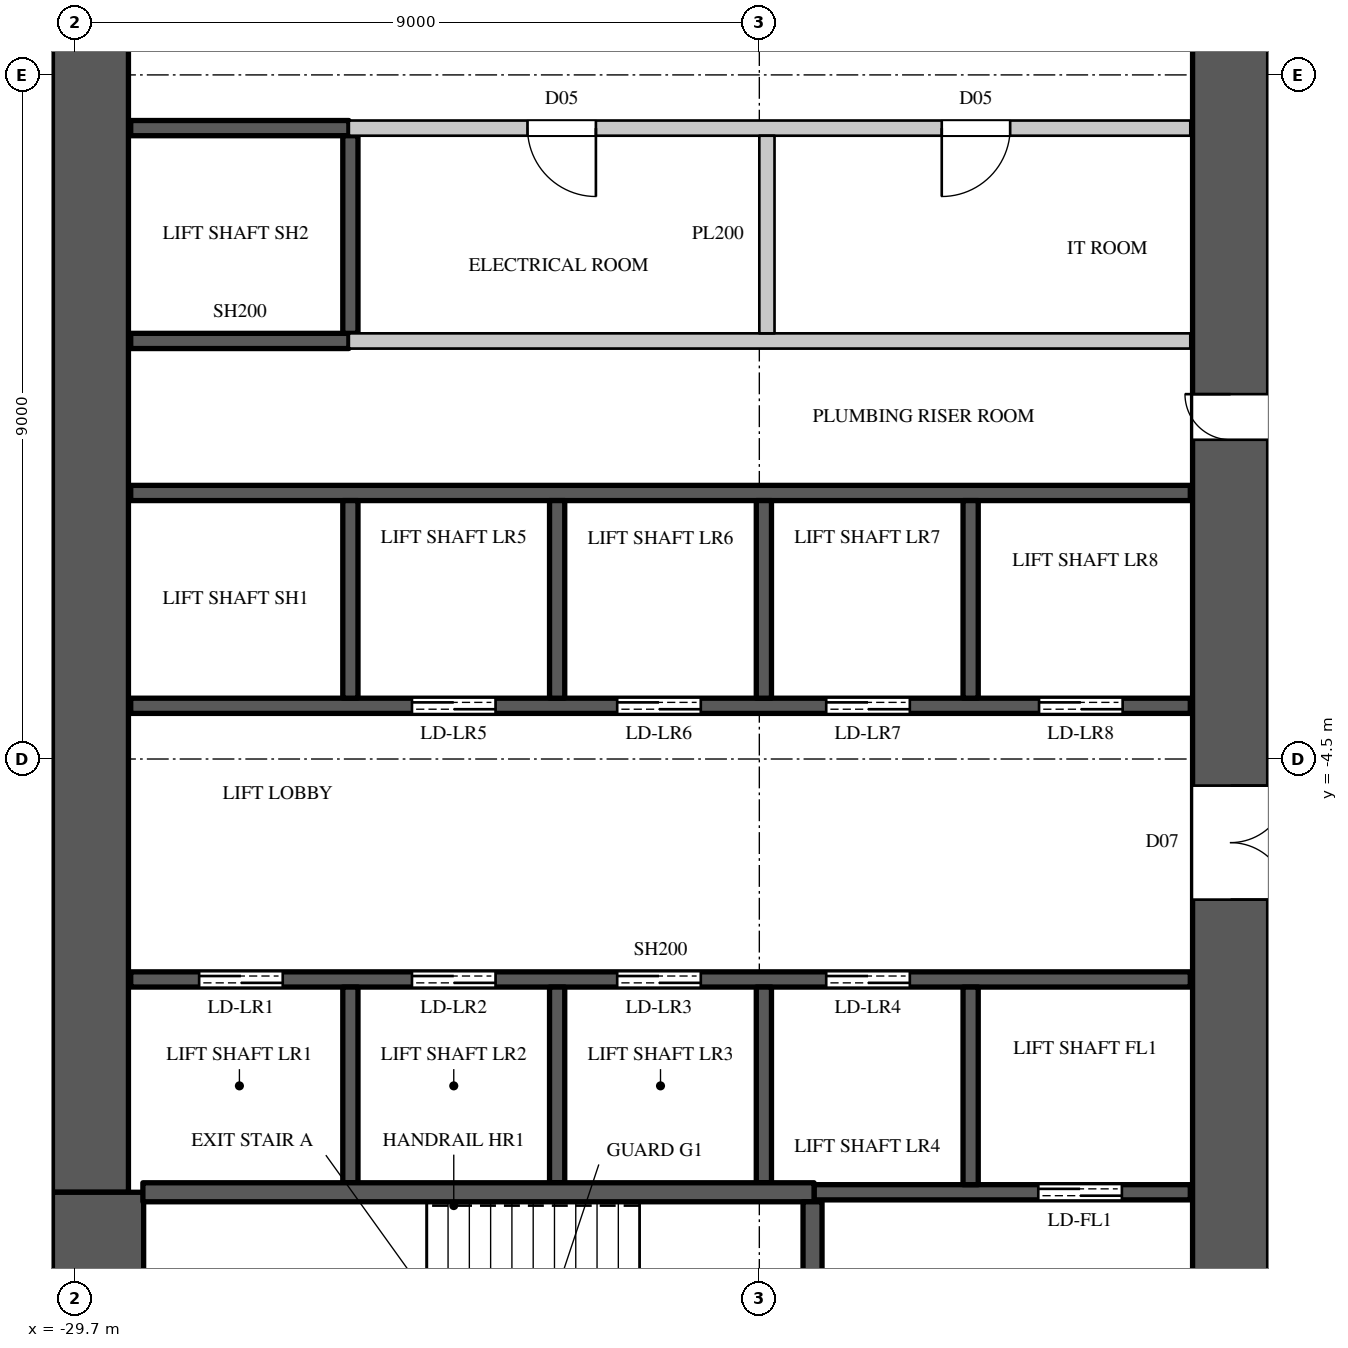
"""IFC4 building model, lengths in metres.
Left out: names, types, materials, properties, quantities, classifications, styles, units other than length and angle.
Written with IfcOpenShell. Run it as: python <this file> out.ifc"""

import sys

from ifc_helpers import new_model, si_unit, direction, frame, frame_2d, origin, place, context, subcontext, project, spatial, rectangle, extrude, element, fill, save


model = new_model("IFC4")
c1 = context("Model", 3, precision=1e-05, world=origin(), true_north=direction((0.0, 1.0)))
c2 = subcontext(c1, "Body", "Model", "MODEL_VIEW")
j1 = project(units=[si_unit("LENGTHUNIT", "METRE"), si_unit("PLANEANGLEUNIT", "RADIAN")], contexts=[c1])
p1 = place(None, origin())
s1 = spatial("IfcSite", under=j1, at=p1, CompositionType="ELEMENT")
p2 = place(p1, origin())
s2 = spatial("IfcBuilding", under=s1, at=p2, CompositionType="ELEMENT")
p3 = place(p2, frame((0.0, 0.0, 138.3)))
s3 = spatial("IfcBuildingStorey", under=s2, at=p3, CompositionType="ELEMENT", Elevation=138.3)
p4 = place(p3, frame((-14.5, -14.8, 0.0), z_axis=(0.0, 0.0, 1.0), x_axis=(0.0, 1.0, 0.0)))
e1 = element("IfcWall", 1, at=p4, inside=s3, PredefinedType="SHEAR", context=c2, shape_type="SweptSolid", body=[
    extrude(rectangle(XDim=29.6, YDim=1.0, at=frame_2d((14.8, 0.0))), origin(), (0.0, 0.0, 1.0), 3.6),
])
p5 = place(p4, frame((8.45, 0.0, 0.0)))
e2 = element("IfcOpeningElement", 2, at=p5, cuts=e1, PredefinedType="OPENING", context=c2, shape_type="SweptSolid", body=[
    extrude(rectangle(XDim=1.5, YDim=2.4, at=frame_2d((0.75, 1.2))), frame((0.0, 0.51, 0.0), z_axis=(0.0, -1.0, 0.0), x_axis=(1.0, 0.0, 0.0)), (0.0, 0.0, 1.0), 1.02),
])
p6 = place(p4, frame((19.65, 0.0, 0.0)))
e3 = element("IfcOpeningElement", 3, at=p6, cuts=e1, PredefinedType="OPENING", context=c2, shape_type="SweptSolid", body=[
    extrude(rectangle(XDim=1.5, YDim=2.4, at=frame_2d((0.75, 1.2))), frame((0.0, 0.51, 0.0), z_axis=(0.0, -1.0, 0.0), x_axis=(1.0, 0.0, 0.0)), (0.0, 0.0, 1.0), 1.02),
])
p7 = place(p4, frame((14.5, 0.0, 0.0)))
e4 = element("IfcOpeningElement", 4, at=p7, cuts=e1, PredefinedType="OPENING", context=c2, shape_type="SweptSolid", body=[
    extrude(rectangle(XDim=0.6, YDim=2.0, at=frame_2d((0.3, 1.0))), frame((0.0, 0.51, 0.0), z_axis=(0.0, -1.0, 0.0), x_axis=(1.0, 0.0, 0.0)), (0.0, 0.0, 1.0), 1.02),
])
p8 = place(p3, frame((-29.5, -10.2, 0.0), z_axis=(0.0, 0.0, 1.0), x_axis=(0.0, 1.0, 0.0)))
e5 = element("IfcWall", 5, at=p8, inside=s3, PredefinedType="SHEAR", context=c2, shape_type="SweptSolid", body=[
    extrude(rectangle(XDim=20.4, YDim=1.0, at=frame_2d((10.2, 0.0))), origin(), (0.0, 0.0, 1.0), 3.6),
])
p9 = place(p3, frame((-29.4, -14.8, 0.0), z_axis=(0.0, 0.0, 1.0), x_axis=(0.0, 1.0, 0.0)))
e6 = element("IfcWall", 6, at=p9, inside=s3, PredefinedType="SHEAR", context=c2, shape_type="SweptSolid", body=[
    extrude(rectangle(XDim=4.6, YDim=1.2, at=frame_2d((2.3, 0.0))), origin(), (0.0, 0.0, 1.0), 3.6),
])
p10 = place(p3, frame((-26.1, 1.0, 0.0), z_axis=(0.0, 0.0, 1.0), x_axis=(1.0, 0.0, 0.0)))
e7 = element("IfcWall", 7, at=p10, inside=s3, PredefinedType="PARTITIONING", context=c2, shape_type="SweptSolid", body=[
    extrude(rectangle(XDim=11.07, YDim=0.2, at=frame_2d((5.535, 0.0))), origin(), (0.0, 0.0, 1.0), 3.3),
])
p11 = place(p3, frame((-26.1, 3.8, 0.0), z_axis=(0.0, 0.0, 1.0), x_axis=(1.0, 0.0, 0.0)))
e8 = element("IfcWall", 8, at=p11, inside=s3, PredefinedType="PARTITIONING", context=c2, shape_type="SweptSolid", body=[
    extrude(rectangle(XDim=11.07, YDim=0.2, at=frame_2d((5.535, 0.0))), origin(), (0.0, 0.0, 1.0), 3.3),
])
p12 = place(p11, frame((2.35, 0.0, 0.0)))
e9 = element("IfcOpeningElement", 9, at=p12, cuts=e8, PredefinedType="OPENING", context=c2, shape_type="SweptSolid", body=[
    extrude(rectangle(XDim=0.9, YDim=2.2, at=frame_2d((0.45, 1.1))), frame((0.0, 0.11, 0.0), z_axis=(0.0, -1.0, 0.0), x_axis=(1.0, 0.0, 0.0)), (0.0, 0.0, 1.0), 0.22),
])
p13 = place(p11, frame((7.8, 0.0, 0.0)))
e10 = element("IfcOpeningElement", 10, at=p13, cuts=e8, PredefinedType="OPENING", context=c2, shape_type="SweptSolid", body=[
    extrude(rectangle(XDim=0.9, YDim=2.2, at=frame_2d((0.45, 1.1))), frame((0.0, 0.11, 0.0), z_axis=(0.0, -1.0, 0.0), x_axis=(1.0, 0.0, 0.0)), (0.0, 0.0, 1.0), 0.22),
])
p14 = place(p3, frame((-20.6, 1.1, 0.0), z_axis=(0.0, 0.0, 1.0), x_axis=(0.0, 1.0, 0.0)))
e11 = element("IfcWall", 11, at=p14, inside=s3, PredefinedType="PARTITIONING", context=c2, shape_type="SweptSolid", body=[
    extrude(rectangle(XDim=2.6, YDim=0.2, at=frame_2d((1.3, 0.0))), origin(), (0.0, 0.0, 1.0), 2.75),
])
p15 = place(p3, frame((-28.97, -7.4, 0.0), z_axis=(0.0, 0.0, 1.0), x_axis=(1.0, 0.0, 0.0)))
e12 = element("IfcWall", 12, at=p15, inside=s3, PredefinedType="SHEAR", context=c2, shape_type="SweptSolid", body=[
    extrude(rectangle(XDim=13.94, YDim=0.2, at=frame_2d((6.97, 0.0))), origin(), (0.0, 0.0, 1.0), 3.3),
])
p16 = place(p15, frame((0.9, 0.0, 0.0)))
e13 = element("IfcOpeningElement", 13, at=p16, cuts=e12, PredefinedType="OPENING", context=c2, shape_type="SweptSolid", body=[
    extrude(rectangle(XDim=1.1, YDim=2.2, at=frame_2d((0.55, 1.1))), frame((0.0, 0.11, 0.0), z_axis=(0.0, -1.0, 0.0), x_axis=(1.0, 0.0, 0.0)), (0.0, 0.0, 1.0), 0.22),
])
p17 = place(p15, frame((3.7, 0.0, 0.0)))
e14 = element("IfcOpeningElement", 14, at=p17, cuts=e12, PredefinedType="OPENING", context=c2, shape_type="SweptSolid", body=[
    extrude(rectangle(XDim=1.1, YDim=2.2, at=frame_2d((0.55, 1.1))), frame((0.0, 0.11, 0.0), z_axis=(0.0, -1.0, 0.0), x_axis=(1.0, 0.0, 0.0)), (0.0, 0.0, 1.0), 0.22),
])
p18 = place(p15, frame((6.4, 0.0, 0.0)))
e15 = element("IfcOpeningElement", 15, at=p18, cuts=e12, PredefinedType="OPENING", context=c2, shape_type="SweptSolid", body=[
    extrude(rectangle(XDim=1.1, YDim=2.2, at=frame_2d((0.55, 1.1))), frame((0.0, 0.11, 0.0), z_axis=(0.0, -1.0, 0.0), x_axis=(1.0, 0.0, 0.0)), (0.0, 0.0, 1.0), 0.22),
])
p19 = place(p15, frame((9.15, 0.0, 0.0)))
e16 = element("IfcOpeningElement", 16, at=p19, cuts=e12, PredefinedType="OPENING", context=c2, shape_type="SweptSolid", body=[
    extrude(rectangle(XDim=1.1, YDim=2.2, at=frame_2d((0.55, 1.1))), frame((0.0, 0.11, 0.0), z_axis=(0.0, -1.0, 0.0), x_axis=(1.0, 0.0, 0.0)), (0.0, 0.0, 1.0), 0.22),
])
p20 = place(p3, frame((-28.97, -3.8, 0.0), z_axis=(0.0, 0.0, 1.0), x_axis=(1.0, 0.0, 0.0)))
e17 = element("IfcWall", 17, at=p20, inside=s3, PredefinedType="SHEAR", context=c2, shape_type="SweptSolid", body=[
    extrude(rectangle(XDim=13.94, YDim=0.2, at=frame_2d((6.97, 0.0))), origin(), (0.0, 0.0, 1.0), 3.3),
])
p21 = place(p20, frame((3.7, 0.0, 0.0)))
e18 = element("IfcOpeningElement", 18, at=p21, cuts=e17, PredefinedType="OPENING", context=c2, shape_type="SweptSolid", body=[
    extrude(rectangle(XDim=1.1, YDim=2.2, at=frame_2d((0.55, 1.1))), frame((0.0, 0.11, 0.0), z_axis=(0.0, -1.0, 0.0), x_axis=(1.0, 0.0, 0.0)), (0.0, 0.0, 1.0), 0.22),
])
p22 = place(p20, frame((6.4, 0.0, 0.0)))
e19 = element("IfcOpeningElement", 19, at=p22, cuts=e17, PredefinedType="OPENING", context=c2, shape_type="SweptSolid", body=[
    extrude(rectangle(XDim=1.1, YDim=2.2, at=frame_2d((0.55, 1.1))), frame((0.0, 0.11, 0.0), z_axis=(0.0, -1.0, 0.0), x_axis=(1.0, 0.0, 0.0)), (0.0, 0.0, 1.0), 0.22),
])
p23 = place(p20, frame((9.15, 0.0, 0.0)))
e20 = element("IfcOpeningElement", 20, at=p23, cuts=e17, PredefinedType="OPENING", context=c2, shape_type="SweptSolid", body=[
    extrude(rectangle(XDim=1.1, YDim=2.2, at=frame_2d((0.55, 1.1))), frame((0.0, 0.11, 0.0), z_axis=(0.0, -1.0, 0.0), x_axis=(1.0, 0.0, 0.0)), (0.0, 0.0, 1.0), 0.22),
])
p24 = place(p20, frame((11.95, 0.0, 0.0)))
e21 = element("IfcOpeningElement", 21, at=p24, cuts=e17, PredefinedType="OPENING", context=c2, shape_type="SweptSolid", body=[
    extrude(rectangle(XDim=1.1, YDim=2.2, at=frame_2d((0.55, 1.1))), frame((0.0, 0.11, 0.0), z_axis=(0.0, -1.0, 0.0), x_axis=(1.0, 0.0, 0.0)), (0.0, 0.0, 1.0), 0.22),
])
p25 = place(p3, frame((-28.97, -1.0, 0.0), z_axis=(0.0, 0.0, 1.0), x_axis=(1.0, 0.0, 0.0)))
e22 = element("IfcWall", 22, at=p25, inside=s3, PredefinedType="SHEAR", context=c2, shape_type="SweptSolid", body=[
    extrude(rectangle(XDim=13.94, YDim=0.2, at=frame_2d((6.97, 0.0))), origin(), (0.0, 0.0, 1.0), 3.3),
])
for number, where, z_axis, x_axis in (
    (23, (-28.97, 1.0, 0.0), (0.0, 0.0, 1.0), (1.0, 0.0, 0.0)),
    (24, (-28.97, 3.8, 0.0), (0.0, 0.0, 1.0), (1.0, 0.0, 0.0)),
):
    element("IfcWall", number, at=place(p3, frame(where, z_axis=z_axis, x_axis=x_axis)), inside=s3, PredefinedType="SHEAR", context=c2, shape_type="SweptSolid", body=[
        extrude(rectangle(XDim=2.87, YDim=0.2, at=frame_2d((1.435, 0.0))), origin(), (0.0, 0.0, 1.0), 3.3),
    ])
p26 = place(p3, frame((-26.08, -10.075, 0.0), z_axis=(0.0, 0.0, 1.0), x_axis=(0.0, 1.0, 0.0)))
e25 = element("IfcWall", 25, at=p26, inside=s3, PredefinedType="SHEAR", context=c2, shape_type="SweptSolid", body=[
    extrude(rectangle(XDim=2.575, YDim=0.2, at=frame_2d((1.288, 0.0))), origin(), (0.0, 0.0, 1.0), 3.6),
])
p27 = place(p3, frame((-26.08, -3.7, 0.0), z_axis=(0.0, 0.0, 1.0), x_axis=(0.0, 1.0, 0.0)))
e26 = element("IfcWall", 26, at=p27, inside=s3, PredefinedType="SHEAR", context=c2, shape_type="SweptSolid", body=[
    extrude(rectangle(XDim=2.6, YDim=0.2, at=frame_2d((1.3, 0.0))), origin(), (0.0, 0.0, 1.0), 3.6),
])
p28 = place(p3, frame((-26.08, 1.1, 0.0), z_axis=(0.0, 0.0, 1.0), x_axis=(0.0, 1.0, 0.0)))
e27 = element("IfcWall", 27, at=p28, inside=s3, PredefinedType="SHEAR", context=c2, shape_type="SweptSolid", body=[
    extrude(rectangle(XDim=2.6, YDim=0.2, at=frame_2d((1.3, 0.0))), origin(), (0.0, 0.0, 1.0), 3.3),
])
p29 = place(p3, frame((-23.36, -10.075, 0.0), z_axis=(0.0, 0.0, 1.0), x_axis=(0.0, 1.0, 0.0)))
e28 = element("IfcWall", 28, at=p29, inside=s3, PredefinedType="SHEAR", context=c2, shape_type="SweptSolid", body=[
    extrude(rectangle(XDim=2.575, YDim=0.2, at=frame_2d((1.288, 0.0))), origin(), (0.0, 0.0, 1.0), 3.6),
])
p30 = place(p3, frame((-23.36, -3.7, 0.0), z_axis=(0.0, 0.0, 1.0), x_axis=(0.0, 1.0, 0.0)))
e29 = element("IfcWall", 29, at=p30, inside=s3, PredefinedType="SHEAR", context=c2, shape_type="SweptSolid", body=[
    extrude(rectangle(XDim=2.6, YDim=0.2, at=frame_2d((1.3, 0.0))), origin(), (0.0, 0.0, 1.0), 3.6),
])
p31 = place(p3, frame((-20.64, -10.075, 0.0), z_axis=(0.0, 0.0, 1.0), x_axis=(0.0, 1.0, 0.0)))
e30 = element("IfcWall", 30, at=p31, inside=s3, PredefinedType="SHEAR", context=c2, shape_type="SweptSolid", body=[
    extrude(rectangle(XDim=2.575, YDim=0.2, at=frame_2d((1.288, 0.0))), origin(), (0.0, 0.0, 1.0), 3.6),
])
p32 = place(p3, frame((-20.64, -3.7, 0.0), z_axis=(0.0, 0.0, 1.0), x_axis=(0.0, 1.0, 0.0)))
e31 = element("IfcWall", 31, at=p32, inside=s3, PredefinedType="SHEAR", context=c2, shape_type="SweptSolid", body=[
    extrude(rectangle(XDim=2.6, YDim=0.2, at=frame_2d((1.3, 0.0))), origin(), (0.0, 0.0, 1.0), 3.6),
])
p33 = place(p3, frame((-19.98, -10.2, 0.0), z_axis=(0.0, 0.0, 1.0), x_axis=(1.0, 0.0, 0.0)))
e32 = element("IfcWall", 32, at=p33, inside=s3, PredefinedType="SHEAR", context=c2, shape_type="SweptSolid", body=[
    extrude(rectangle(XDim=4.95, YDim=0.2, at=frame_2d((2.475, 0.0))), origin(), (0.0, 0.0, 1.0), 3.3),
])
p34 = place(p33, frame((2.95, 0.0, 0.0)))
e33 = element("IfcOpeningElement", 33, at=p34, cuts=e32, PredefinedType="OPENING", context=c2, shape_type="SweptSolid", body=[
    extrude(rectangle(XDim=1.1, YDim=2.2, at=frame_2d((0.55, 1.1))), frame((0.0, 0.11, 0.0), z_axis=(0.0, -1.0, 0.0), x_axis=(1.0, 0.0, 0.0)), (0.0, 0.0, 1.0), 0.22),
])
p35 = place(p3, frame((-17.92, -10.1, 0.0), z_axis=(0.0, 0.0, 1.0), x_axis=(0.0, 1.0, 0.0)))
e34 = element("IfcWall", 34, at=p35, inside=s3, PredefinedType="SHEAR", context=c2, shape_type="SweptSolid", body=[
    extrude(rectangle(XDim=2.6, YDim=0.2, at=frame_2d((1.3, 0.0))), origin(), (0.0, 0.0, 1.0), 3.6),
])
p36 = place(p3, frame((-17.92, -3.7, 0.0), z_axis=(0.0, 0.0, 1.0), x_axis=(0.0, 1.0, 0.0)))
e35 = element("IfcWall", 35, at=p36, inside=s3, PredefinedType="SHEAR", context=c2, shape_type="SweptSolid", body=[
    extrude(rectangle(XDim=2.6, YDim=0.2, at=frame_2d((1.3, 0.0))), origin(), (0.0, 0.0, 1.0), 3.6),
])
p37 = place(p3, frame((-28.81, -10.2, 0.0), z_axis=(0.0, 0.0, 1.0), x_axis=(1.0, 0.0, 0.0)))
e36 = element("IfcWall", 36, at=p37, inside=s3, PredefinedType="SHEAR", context=c2, shape_type="SweptSolid", body=[
    extrude(rectangle(XDim=8.83, YDim=0.25, at=frame_2d((4.415, 0.0))), origin(), (0.0, 0.0, 1.0), 3.3),
])
p38 = place(p3, frame((-20.0, -14.77, 0.0), z_axis=(0.0, 0.0, 1.0), x_axis=(0.0, 1.0, 0.0)))
e37 = element("IfcWall", 37, at=p38, inside=s3, PredefinedType="SHEAR", context=c2, shape_type="SweptSolid", body=[
    extrude(rectangle(XDim=4.445, YDim=0.25, at=frame_2d((2.223, 0.0))), origin(), (0.0, 0.0, 1.0), 3.3),
])
p39 = place(p38, frame((1.7, 0.0, 0.0)))
e38 = element("IfcOpeningElement", 38, at=p39, cuts=e37, PredefinedType="OPENING", context=c2, shape_type="SweptSolid", body=[
    extrude(rectangle(XDim=1.1, YDim=2.2, at=frame_2d((0.55, 1.1))), frame((0.0, 0.135, 0.0), z_axis=(0.0, -1.0, 0.0), x_axis=(1.0, 0.0, 0.0)), (0.0, 0.0, 1.0), 0.27),
])
p40 = place(p12, origin())
e39 = element("IfcDoor", 39, at=p40, inside=s3, OperationType="SINGLE_SWING_LEFT", PredefinedType="DOOR", context=c2, shape_type="SweptSolid", body=[
    extrude(rectangle(XDim=0.9, YDim=2.2, at=frame_2d((0.45, 1.1))), frame((0.0, 0.025, 0.0), z_axis=(0.0, -1.0, 0.0), x_axis=(1.0, 0.0, 0.0)), (0.0, 0.0, 1.0), 0.05),
])
fill(e9, e39)
p41 = place(p13, origin())
e40 = element("IfcDoor", 40, at=p41, inside=s3, OperationType="SINGLE_SWING_RIGHT", PredefinedType="DOOR", context=c2, shape_type="SweptSolid", body=[
    extrude(rectangle(XDim=0.9, YDim=2.2, at=frame_2d((0.45, 1.1))), frame((0.0, 0.025, 0.0), z_axis=(0.0, -1.0, 0.0), x_axis=(1.0, 0.0, 0.0)), (0.0, 0.0, 1.0), 0.05),
])
fill(e10, e40)
p42 = place(p16, origin())
e41 = element("IfcDoor", 41, at=p42, inside=s3, OperationType="DOUBLE_DOOR_SLIDING", PredefinedType="DOOR", context=c2, shape_type="SweptSolid", body=[
    extrude(rectangle(XDim=1.1, YDim=2.2, at=frame_2d((0.55, 1.1))), frame((0.0, 0.025, 0.0), z_axis=(0.0, -1.0, 0.0), x_axis=(1.0, 0.0, 0.0)), (0.0, 0.0, 1.0), 0.05),
])
fill(e13, e41)
p43 = place(p17, origin())
e42 = element("IfcDoor", 42, at=p43, inside=s3, OperationType="DOUBLE_DOOR_SLIDING", PredefinedType="DOOR", context=c2, shape_type="SweptSolid", body=[
    extrude(rectangle(XDim=1.1, YDim=2.2, at=frame_2d((0.55, 1.1))), frame((0.0, 0.025, 0.0), z_axis=(0.0, -1.0, 0.0), x_axis=(1.0, 0.0, 0.0)), (0.0, 0.0, 1.0), 0.05),
])
fill(e14, e42)
p44 = place(p18, origin())
e43 = element("IfcDoor", 43, at=p44, inside=s3, OperationType="DOUBLE_DOOR_SLIDING", PredefinedType="DOOR", context=c2, shape_type="SweptSolid", body=[
    extrude(rectangle(XDim=1.1, YDim=2.2, at=frame_2d((0.55, 1.1))), frame((0.0, 0.025, 0.0), z_axis=(0.0, -1.0, 0.0), x_axis=(1.0, 0.0, 0.0)), (0.0, 0.0, 1.0), 0.05),
])
fill(e15, e43)
p45 = place(p19, origin())
e44 = element("IfcDoor", 44, at=p45, inside=s3, OperationType="DOUBLE_DOOR_SLIDING", PredefinedType="DOOR", context=c2, shape_type="SweptSolid", body=[
    extrude(rectangle(XDim=1.1, YDim=2.2, at=frame_2d((0.55, 1.1))), frame((0.0, 0.025, 0.0), z_axis=(0.0, -1.0, 0.0), x_axis=(1.0, 0.0, 0.0)), (0.0, 0.0, 1.0), 0.05),
])
fill(e16, e44)
p46 = place(p34, origin())
e45 = element("IfcDoor", 45, at=p46, inside=s3, OperationType="DOUBLE_DOOR_SLIDING", PredefinedType="DOOR", context=c2, shape_type="SweptSolid", body=[
    extrude(rectangle(XDim=1.1, YDim=2.2, at=frame_2d((0.55, 1.1))), frame((0.0, 0.025, 0.0), z_axis=(0.0, -1.0, 0.0), x_axis=(1.0, 0.0, 0.0)), (0.0, 0.0, 1.0), 0.05),
])
fill(e33, e45)
p47 = place(p21, origin())
e46 = element("IfcDoor", 46, at=p47, inside=s3, OperationType="DOUBLE_DOOR_SLIDING", PredefinedType="DOOR", context=c2, shape_type="SweptSolid", body=[
    extrude(rectangle(XDim=1.1, YDim=2.2, at=frame_2d((0.55, 1.1))), frame((0.0, 0.025, 0.0), z_axis=(0.0, -1.0, 0.0), x_axis=(1.0, 0.0, 0.0)), (0.0, 0.0, 1.0), 0.05),
])
fill(e18, e46)
p48 = place(p22, origin())
e47 = element("IfcDoor", 47, at=p48, inside=s3, OperationType="DOUBLE_DOOR_SLIDING", PredefinedType="DOOR", context=c2, shape_type="SweptSolid", body=[
    extrude(rectangle(XDim=1.1, YDim=2.2, at=frame_2d((0.55, 1.1))), frame((0.0, 0.025, 0.0), z_axis=(0.0, -1.0, 0.0), x_axis=(1.0, 0.0, 0.0)), (0.0, 0.0, 1.0), 0.05),
])
fill(e19, e47)
p49 = place(p23, origin())
e48 = element("IfcDoor", 48, at=p49, inside=s3, OperationType="DOUBLE_DOOR_SLIDING", PredefinedType="DOOR", context=c2, shape_type="SweptSolid", body=[
    extrude(rectangle(XDim=1.1, YDim=2.2, at=frame_2d((0.55, 1.1))), frame((0.0, 0.025, 0.0), z_axis=(0.0, -1.0, 0.0), x_axis=(1.0, 0.0, 0.0)), (0.0, 0.0, 1.0), 0.05),
])
fill(e20, e48)
p50 = place(p24, origin())
e49 = element("IfcDoor", 49, at=p50, inside=s3, OperationType="DOUBLE_DOOR_SLIDING", PredefinedType="DOOR", context=c2, shape_type="SweptSolid", body=[
    extrude(rectangle(XDim=1.1, YDim=2.2, at=frame_2d((0.55, 1.1))), frame((0.0, 0.025, 0.0), z_axis=(0.0, -1.0, 0.0), x_axis=(1.0, 0.0, 0.0)), (0.0, 0.0, 1.0), 0.05),
])
fill(e21, e49)
p51 = place(p5, origin())
e50 = element("IfcDoor", 50, at=p51, inside=s3, OperationType="DOUBLE_DOOR_SINGLE_SWING", PredefinedType="DOOR", context=c2, shape_type="SweptSolid", body=[
    extrude(rectangle(XDim=1.5, YDim=2.4, at=frame_2d((0.75, 1.2))), frame((0.0, -0.445, 0.0), z_axis=(0.0, -1.0, 0.0), x_axis=(1.0, 0.0, 0.0)), (0.0, 0.0, 1.0), 0.05),
])
fill(e2, e50)
p52 = place(p7, origin())
e51 = element("IfcDoor", 51, at=p52, inside=s3, OperationType="SINGLE_SWING_RIGHT", PredefinedType="DOOR", context=c2, shape_type="SweptSolid", body=[
    extrude(rectangle(XDim=0.6, YDim=2.0, at=frame_2d((0.3, 1.0))), frame((0.0, 0.495, 0.0), z_axis=(0.0, -1.0, 0.0), x_axis=(1.0, 0.0, 0.0)), (0.0, 0.0, 1.0), 0.05),
])
fill(e4, e51)
save(model, sys.argv[1])
